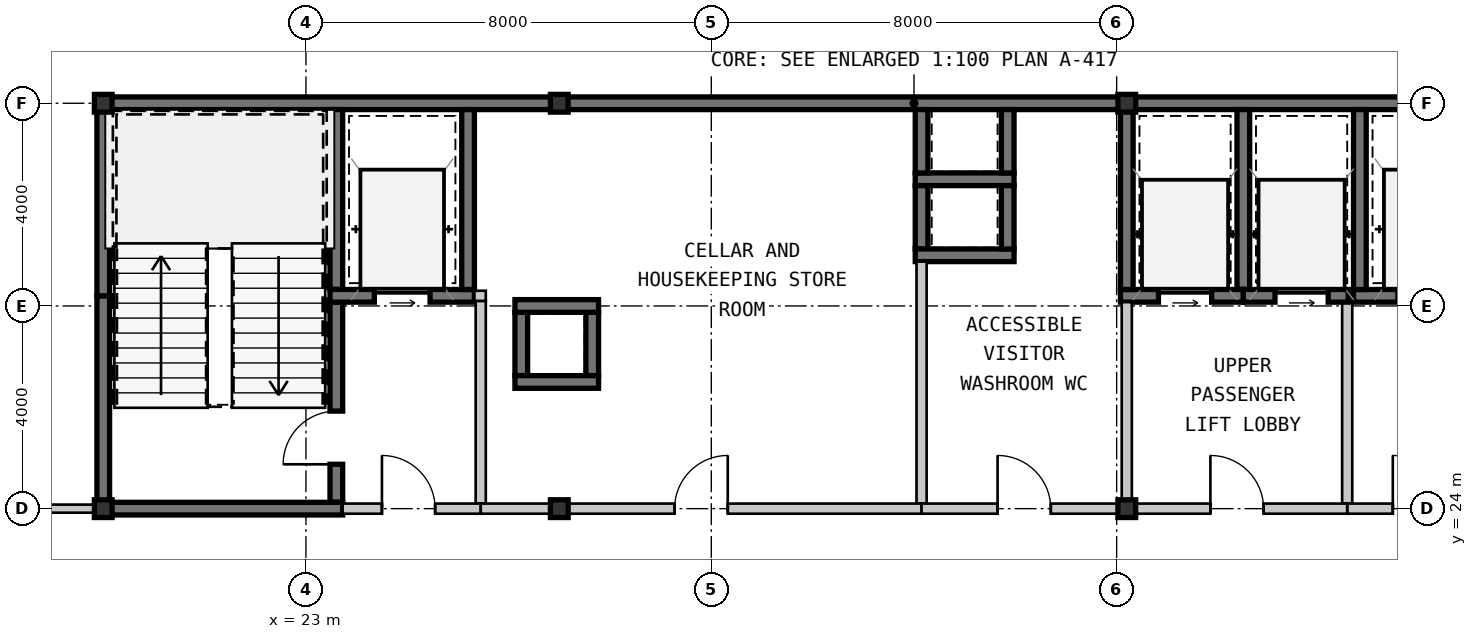
"""IFC4 building model, lengths in metres.
Left out: names, types, materials, properties, quantities, classifications, styles, units other than length and angle.
Written with IfcOpenShell. Run it as: python <this file> out.ifc"""

import sys

from ifc_helpers import new_model, si_unit, direction, frame, frame_2d, origin, origin_2d, place, context, subcontext, project, spatial, rectangle, hollow_rectangle, extrude, source, transform, mapped, element, fill, save


model = new_model("IFC4")
c1 = context("Model", 3, precision=1e-05, world=origin(), true_north=direction((0.0, 1.0)))
c2 = subcontext(c1, "Body", "Model", "MODEL_VIEW")
j1 = project(units=[si_unit("LENGTHUNIT", "METRE"), si_unit("PLANEANGLEUNIT", "RADIAN")], contexts=[c1])
p1 = place(None, origin())
s1 = spatial("IfcSite", under=j1, at=p1, CompositionType="ELEMENT")
p2 = place(p1, origin())
s2 = spatial("IfcBuilding", under=s1, at=p2, CompositionType="ELEMENT")
p3 = place(p2, frame((0.0, 0.0, 185.15)))
s3 = spatial("IfcBuildingStorey", under=s2, at=p3, CompositionType="ELEMENT", Elevation=185.15)
m1 = source(origin(), c2, "Body", "SweptSolid", [
    extrude(hollow_rectangle(XDim=0.35, YDim=0.35, WallThickness=0.016, at=origin_2d()), origin(), (0.0, 0.0, 1.0), 3.15),
])
for number, where, z_axis, x_axis in (
    (1, (19.0, 24.0, 0.0), (0.0, 0.0, 1.0), (1.0, 0.0, 0.0)),
    (2, (28.0, 24.0, 0.0), (0.0, 0.0, 1.0), (1.0, 0.0, 0.0)),
    (3, (39.2, 24.0, 0.0), (0.0, 0.0, 1.0), (1.0, 0.0, 0.0)),
    (4, (19.0, 32.0, 0.0), (0.0, 0.0, 1.0), (1.0, 0.0, 0.0)),
    (5, (28.0, 32.0, 0.0), (0.0, 0.0, 1.0), (1.0, 0.0, 0.0)),
    (6, (39.2, 32.0, 0.0), (0.0, 0.0, 1.0), (1.0, 0.0, 0.0)),
):
    element("IfcColumn", number, at=place(p3, frame(where, z_axis=z_axis, x_axis=x_axis)), inside=s3, PredefinedType="COLUMN", context=c2, shape_type="MappedRepresentation", body=[
        mapped(m1, transform((0.0, 0.0, 0.0), scale=1.0)),
    ])
m2 = source(origin(), c2, "Body", "SweptSolid", [
    extrude(rectangle(XDim=9.125, YDim=0.25, at=frame_2d((4.562, 0.0))), origin(), (0.0, 0.0, 1.0), 2.93),
])
p4 = place(p3, frame((18.875, 32.0, 0.0), z_axis=(0.0, 0.0, 1.0), x_axis=(1.0, 0.0, 0.0)))
e7 = element("IfcWall", 7, at=p4, inside=s3, PredefinedType="SHEAR", context=c2, shape_type="MappedRepresentation", body=[
    mapped(m2, transform((0.0, 0.0, 0.0), scale=1.0)),
])
m3 = source(origin(), c2, "Body", "SweptSolid", [
    extrude(rectangle(XDim=11.2, YDim=0.25, at=frame_2d((5.6, 0.0))), origin(), (0.0, 0.0, 1.0), 2.93),
])
p5 = place(p3, frame((28.0, 32.0, 0.0), z_axis=(0.0, 0.0, 1.0), x_axis=(1.0, 0.0, 0.0)))
e8 = element("IfcWall", 8, at=p5, inside=s3, PredefinedType="SHEAR", context=c2, shape_type="MappedRepresentation", body=[
    mapped(m3, transform((0.0, 0.0, 0.0), scale=1.0)),
])
m4 = source(origin(), c2, "Body", "SweptSolid", [
    extrude(rectangle(XDim=11.925, YDim=0.25, at=frame_2d((5.962, 0.0))), origin(), (0.0, 0.0, 1.0), 2.93),
])
p6 = place(p3, frame((39.2, 32.0, 0.0), z_axis=(0.0, 0.0, 1.0), x_axis=(1.0, 0.0, 0.0)))
e9 = element("IfcWall", 9, at=p6, inside=s3, PredefinedType="SHEAR", context=c2, shape_type="MappedRepresentation", body=[
    mapped(m4, transform((0.0, 0.0, 0.0), scale=1.0)),
])
m5 = source(origin(), c2, "Body", "SweptSolid", [
    extrude(rectangle(XDim=4.075, YDim=0.25, at=frame_2d((2.038, 0.0))), origin(), (0.0, 0.0, 1.0), 2.93),
])
p7 = place(p3, frame((19.0, 24.125, 0.0), z_axis=(0.0, 0.0, 1.0), x_axis=(0.0, 1.0, 0.0)))
e10 = element("IfcWall", 10, at=p7, inside=s3, PredefinedType="SHEAR", context=c2, shape_type="MappedRepresentation", body=[
    mapped(m5, transform((0.0, 0.0, 0.0), scale=1.0)),
])
m6 = source(origin(), c2, "Body", "SweptSolid", [
    extrude(rectangle(XDim=3.675, YDim=0.25, at=frame_2d((1.837, 0.0))), origin(), (0.0, 0.0, 1.0), 2.93),
])
p8 = place(p3, frame((19.0, 28.2, 0.0), z_axis=(0.0, 0.0, 1.0), x_axis=(0.0, 1.0, 0.0)))
e11 = element("IfcWall", 11, at=p8, inside=s3, PredefinedType="SHEAR", context=c2, shape_type="MappedRepresentation", body=[
    mapped(m6, transform((0.0, 0.0, 0.0), scale=1.0)),
])
m7 = source(origin(), c2, "Body", "SweptSolid", [
    extrude(rectangle(XDim=3.55, YDim=0.25, at=frame_2d((1.775, 0.0))), origin(), (0.0, 0.0, 1.0), 2.93),
])
p9 = place(p3, frame((23.6, 28.325, 0.0), z_axis=(0.0, 0.0, 1.0), x_axis=(0.0, 1.0, 0.0)))
e12 = element("IfcWall", 12, at=p9, inside=s3, PredefinedType="SHEAR", context=c2, shape_type="MappedRepresentation", body=[
    mapped(m7, transform((0.0, 0.0, 0.0), scale=1.0)),
])
m8 = source(origin(), c2, "Body", "SweptSolid", [
    extrude(rectangle(XDim=3.95, YDim=0.25, at=frame_2d((1.975, 0.0))), origin(), (0.0, 0.0, 1.0), 2.93),
])
p10 = place(p3, frame((23.6, 24.125, 0.0), z_axis=(0.0, 0.0, 1.0), x_axis=(0.0, 1.0, 0.0)))
e13 = element("IfcWall", 13, at=p10, inside=s3, PredefinedType="SHEAR", context=c2, shape_type="MappedRepresentation", body=[
    mapped(m8, transform((0.0, 0.0, 0.0), scale=1.0)),
])
m9 = source(origin(), c2, "Body", "SweptSolid", [
    extrude(rectangle(XDim=1.05, YDim=2.1, at=frame_2d((0.525, 1.05))), frame((0.0, 0.135, 0.0), z_axis=(0.0, -1.0, 0.0), x_axis=(1.0, 0.0, 0.0)), (0.0, 0.0, 1.0), 0.27),
])
p11 = place(p10, frame((0.75, 0.0, 0.0)))
e14 = element("IfcOpeningElement", 14, at=p11, cuts=e13, PredefinedType="OPENING", context=c2, shape_type="MappedRepresentation", body=[
    mapped(m9, transform((0.0, 0.0, 0.0), scale=1.0)),
])
m10 = source(origin(), c2, "Body", "SweptSolid", [
    extrude(rectangle(XDim=4.85, YDim=0.25, at=frame_2d((2.425, 0.0))), origin(), (0.0, 0.0, 1.0), 2.93),
])
p12 = place(p3, frame((18.875, 24.0, 0.0), z_axis=(0.0, 0.0, 1.0), x_axis=(1.0, 0.0, 0.0)))
e15 = element("IfcWall", 15, at=p12, inside=s3, PredefinedType="SHEAR", context=c2, shape_type="MappedRepresentation", body=[
    mapped(m10, transform((0.0, 0.0, 0.0), scale=1.0)),
])
m11 = source(origin(), c2, "Body", "SweptSolid", [
    extrude(rectangle(XDim=2.85, YDim=0.25, at=frame_2d((1.425, 0.0))), origin(), (0.0, 0.0, 1.0), 2.93),
])
p13 = place(p3, frame((23.475, 28.2, 0.0), z_axis=(0.0, 0.0, 1.0), x_axis=(1.0, 0.0, 0.0)))
e16 = element("IfcWall", 16, at=p13, inside=s3, PredefinedType="SHEAR", context=c2, shape_type="MappedRepresentation", body=[
    mapped(m11, transform((0.0, 0.0, 0.0), scale=1.0)),
])
m12 = source(origin(), c2, "Body", "SweptSolid", [
    extrude(rectangle(XDim=1.1, YDim=2.15, at=frame_2d((0.55, 1.075))), frame((0.0, 0.135, 0.0), z_axis=(0.0, -1.0, 0.0), x_axis=(1.0, 0.0, 0.0)), (0.0, 0.0, 1.0), 0.27),
])
p14 = place(p13, frame((0.875, 0.0, 0.0)))
e17 = element("IfcOpeningElement", 17, at=p14, cuts=e16, PredefinedType="OPENING", context=c2, shape_type="MappedRepresentation", body=[
    mapped(m12, transform((0.0, 0.0, 0.0), scale=1.0)),
])
p15 = place(p3, frame((26.2, 28.325, 0.0), z_axis=(0.0, 0.0, 1.0), x_axis=(0.0, 1.0, 0.0)))
e18 = element("IfcWall", 18, at=p15, inside=s3, PredefinedType="SHEAR", context=c2, shape_type="MappedRepresentation", body=[
    mapped(m7, transform((0.0, 0.0, 0.0), scale=1.0)),
])
m13 = source(origin(), c2, "Body", "SweptSolid", [
    extrude(rectangle(XDim=4.0, YDim=0.2, at=frame_2d((2.0, 0.0))), origin(), (0.0, 0.0, 1.0), 2.93),
])
p16 = place(p3, frame((26.45, 24.1, 0.0), z_axis=(0.0, 0.0, 1.0), x_axis=(0.0, 1.0, 0.0)))
e19 = element("IfcWall", 19, at=p16, inside=s3, PredefinedType="SOLIDWALL", context=c2, shape_type="MappedRepresentation", body=[
    mapped(m13, transform((0.0, 0.0, 0.0), scale=1.0)),
])
m14 = source(origin(), c2, "Body", "SweptSolid", [
    extrude(rectangle(XDim=2.725, YDim=0.2, at=frame_2d((1.362, 0.0))), origin(), (0.0, 0.0, 1.0), 2.47),
])
p17 = place(p3, frame((23.725, 24.0, 0.0), z_axis=(0.0, 0.0, 1.0), x_axis=(1.0, 0.0, 0.0)))
e20 = element("IfcWall", 20, at=p17, inside=s3, PredefinedType="SOLIDWALL", context=c2, shape_type="MappedRepresentation", body=[
    mapped(m14, transform((0.0, 0.0, 0.0), scale=1.0)),
])
m15 = source(origin(), c2, "Body", "SweptSolid", [
    extrude(rectangle(XDim=1.05, YDim=2.1, at=frame_2d((0.525, 1.05))), frame((0.0, 0.11, 0.0), z_axis=(0.0, -1.0, 0.0), x_axis=(1.0, 0.0, 0.0)), (0.0, 0.0, 1.0), 0.22),
])
p18 = place(p17, frame((0.775, 0.0, 0.0)))
e21 = element("IfcOpeningElement", 21, at=p18, cuts=e20, PredefinedType="OPENING", context=c2, shape_type="MappedRepresentation", body=[
    mapped(m15, transform((0.0, 0.0, 0.0), scale=1.0)),
])
p19 = place(p3, frame((43.675, 28.2, 0.0), z_axis=(0.0, 0.0, 1.0), x_axis=(1.0, 0.0, 0.0)))
e22 = element("IfcWall", 22, at=p19, inside=s3, PredefinedType="SHEAR", context=c2, shape_type="MappedRepresentation", body=[
    mapped(m11, transform((0.0, 0.0, 0.0), scale=1.0)),
])
p20 = place(p19, frame((0.875, 0.0, 0.0)))
e23 = element("IfcOpeningElement", 23, at=p20, cuts=e22, PredefinedType="OPENING", context=c2, shape_type="MappedRepresentation", body=[
    mapped(m12, transform((0.0, 0.0, 0.0), scale=1.0)),
])
p21 = place(p3, frame((43.8, 31.875, 0.0), z_axis=(0.0, 0.0, 1.0), x_axis=(0.0, -1.0, 0.0)))
e24 = element("IfcWall", 24, at=p21, inside=s3, PredefinedType="SHEAR", context=c2, shape_type="MappedRepresentation", body=[
    mapped(m7, transform((0.0, 0.0, 0.0), scale=1.0)),
])
m16 = source(origin(), c2, "Body", "SweptSolid", [
    extrude(rectangle(XDim=3.975, YDim=0.2, at=frame_2d((1.987, 0.0))), origin(), (0.0, 0.0, 1.0), 2.93),
])
p22 = place(p3, frame((43.55, 28.075, 0.0), z_axis=(0.0, 0.0, 1.0), x_axis=(0.0, -1.0, 0.0)))
e25 = element("IfcWall", 25, at=p22, inside=s3, PredefinedType="SOLIDWALL", context=c2, shape_type="MappedRepresentation", body=[
    mapped(m16, transform((0.0, 0.0, 0.0), scale=1.0)),
])
m17 = source(origin(), c2, "Body", "SweptSolid", [
    extrude(rectangle(XDim=2.725, YDim=0.2, at=frame_2d((1.362, 0.0))), origin(), (0.0, 0.0, 1.0), 2.397),
])
p23 = place(p3, frame((43.55, 24.0, 0.0), z_axis=(0.0, 0.0, 1.0), x_axis=(1.0, 0.0, 0.0)))
e26 = element("IfcWall", 26, at=p23, inside=s3, PredefinedType="SOLIDWALL", context=c2, shape_type="MappedRepresentation", body=[
    mapped(m17, transform((0.0, 0.0, 0.0), scale=1.0)),
])
p24 = place(p23, frame((0.9, 0.0, 0.0)))
e27 = element("IfcOpeningElement", 27, at=p24, cuts=e26, PredefinedType="OPENING", context=c2, shape_type="MappedRepresentation", body=[
    mapped(m15, transform((0.0, 0.0, 0.0), scale=1.0)),
])
m18 = source(origin(), c2, "Body", "SweptSolid", [
    extrude(rectangle(XDim=1.95, YDim=0.25, at=frame_2d((0.975, 0.0))), origin(), (0.0, 0.0, 1.0), 2.93),
])
p25 = place(p3, frame((35.025, 30.5, 0.0), z_axis=(0.0, 0.0, 1.0), x_axis=(1.0, 0.0, 0.0)))
e28 = element("IfcWall", 28, at=p25, inside=s3, PredefinedType="SHEAR", context=c2, shape_type="MappedRepresentation", body=[
    mapped(m18, transform((0.0, 0.0, 0.0), scale=1.0)),
])
m19 = source(origin(), c2, "Body", "SweptSolid", [
    extrude(rectangle(XDim=1.25, YDim=0.25, at=frame_2d((0.625, 0.0))), origin(), (0.0, 0.0, 1.0), 2.93),
])
for number, where, z_axis, x_axis in (
    (29, (35.15, 31.875, 0.0), (0.0, 0.0, 1.0), (0.0, -1.0, 0.0)),
    (30, (36.85, 30.625, 0.0), (0.0, 0.0, 1.0), (0.0, 1.0, 0.0)),
    (31, (35.15, 30.375, 0.0), (0.0, 0.0, 1.0), (0.0, -1.0, 0.0)),
):
    element("IfcWall", number, at=place(p3, frame(where, z_axis=z_axis, x_axis=x_axis)), inside=s3, PredefinedType="SHEAR", context=c2, shape_type="MappedRepresentation", body=[
        mapped(m19, transform((0.0, 0.0, 0.0), scale=1.0)),
    ])
p26 = place(p3, frame((35.025, 29.0, 0.0), z_axis=(0.0, 0.0, 1.0), x_axis=(1.0, 0.0, 0.0)))
e32 = element("IfcWall", 32, at=p26, inside=s3, PredefinedType="SHEAR", context=c2, shape_type="MappedRepresentation", body=[
    mapped(m18, transform((0.0, 0.0, 0.0), scale=1.0)),
])
for number, where, z_axis, x_axis in (
    (33, (36.85, 29.125, 0.0), (0.0, 0.0, 1.0), (0.0, 1.0, 0.0)),
    (34, (28.65, 26.625, 0.0), (0.0, 0.0, 1.0), (0.0, 1.0, 0.0)),
    (35, (27.25, 27.875, 0.0), (0.0, 0.0, 1.0), (0.0, -1.0, 0.0)),
):
    element("IfcWall", number, at=place(p3, frame(where, z_axis=z_axis, x_axis=x_axis)), inside=s3, PredefinedType="SHEAR", context=c2, shape_type="MappedRepresentation", body=[
        mapped(m19, transform((0.0, 0.0, 0.0), scale=1.0)),
    ])
m20 = source(origin(), c2, "Body", "SweptSolid", [
    extrude(rectangle(XDim=1.65, YDim=0.25, at=frame_2d((0.825, 0.0))), origin(), (0.0, 0.0, 1.0), 2.93),
])
for number, where, z_axis, x_axis in (
    (36, (28.775, 28.0, 0.0), (0.0, 0.0, 1.0), (-1.0, 0.0, 0.0)),
    (37, (27.125, 26.5, 0.0), (0.0, 0.0, 1.0), (1.0, 0.0, 0.0)),
):
    element("IfcWall", number, at=place(p3, frame(where, z_axis=z_axis, x_axis=x_axis)), inside=s3, PredefinedType="SHEAR", context=c2, shape_type="MappedRepresentation", body=[
        mapped(m20, transform((0.0, 0.0, 0.0), scale=1.0)),
    ])
p27 = place(p3, frame((41.5, 28.325, 0.0), z_axis=(0.0, 0.0, 1.0), x_axis=(0.0, 1.0, 0.0)))
e38 = element("IfcWall", 38, at=p27, inside=s3, PredefinedType="SHEAR", context=c2, shape_type="MappedRepresentation", body=[
    mapped(m7, transform((0.0, 0.0, 0.0), scale=1.0)),
])
m21 = source(origin(), c2, "Body", "SweptSolid", [
    extrude(rectangle(XDim=2.425, YDim=0.25, at=frame_2d((1.212, 0.0))), origin(), (0.0, 0.0, 1.0), 2.93),
])
p28 = place(p3, frame((39.075, 28.2, 0.0), z_axis=(0.0, 0.0, 1.0), x_axis=(1.0, 0.0, 0.0)))
e39 = element("IfcWall", 39, at=p28, inside=s3, PredefinedType="SHEAR", context=c2, shape_type="MappedRepresentation", body=[
    mapped(m21, transform((0.0, 0.0, 0.0), scale=1.0)),
])
m22 = source(origin(), c2, "Body", "SweptSolid", [
    extrude(rectangle(XDim=1.05, YDim=2.15, at=frame_2d((0.525, 1.075))), frame((0.0, 0.135, 0.0), z_axis=(0.0, -1.0, 0.0), x_axis=(1.0, 0.0, 0.0)), (0.0, 0.0, 1.0), 0.27),
])
p29 = place(p28, frame((0.75, 0.0, 0.0)))
e40 = element("IfcOpeningElement", 40, at=p29, cuts=e39, PredefinedType="OPENING", context=c2, shape_type="MappedRepresentation", body=[
    mapped(m22, transform((0.0, 0.0, 0.0), scale=1.0)),
])
p30 = place(p3, frame((39.2, 31.875, 0.0), z_axis=(0.0, 0.0, 1.0), x_axis=(0.0, -1.0, 0.0)))
e41 = element("IfcWall", 41, at=p30, inside=s3, PredefinedType="SHEAR", context=c2, shape_type="MappedRepresentation", body=[
    mapped(m7, transform((0.0, 0.0, 0.0), scale=1.0)),
])
m23 = source(origin(), c2, "Body", "SweptSolid", [
    extrude(rectangle(XDim=2.07, YDim=0.25, at=frame_2d((1.035, 0.0))), origin(), (0.0, 0.0, 1.0), 2.93),
])
p31 = place(p3, frame((41.5, 28.2, 0.0), z_axis=(0.0, 0.0, 1.0), x_axis=(1.0, 0.0, 0.0)))
e42 = element("IfcWall", 42, at=p31, inside=s3, PredefinedType="SHEAR", context=c2, shape_type="MappedRepresentation", body=[
    mapped(m23, transform((0.0, 0.0, 0.0), scale=1.0)),
])
p32 = place(p31, frame((0.625, 0.0, 0.0)))
e43 = element("IfcOpeningElement", 43, at=p32, cuts=e42, PredefinedType="OPENING", context=c2, shape_type="MappedRepresentation", body=[
    mapped(m22, transform((0.0, 0.0, 0.0), scale=1.0)),
])
m24 = source(origin(), c2, "Body", "SweptSolid", [
    extrude(rectangle(XDim=3.975, YDim=0.2, at=frame_2d((1.987, 0.0))), origin(), (0.0, 0.0, 1.0), 2.47),
])
p33 = place(p3, frame((39.2, 24.1, 0.0), z_axis=(0.0, 0.0, 1.0), x_axis=(0.0, 1.0, 0.0)))
e44 = element("IfcWall", 44, at=p33, inside=s3, PredefinedType="SOLIDWALL", context=c2, shape_type="MappedRepresentation", body=[
    mapped(m24, transform((0.0, 0.0, 0.0), scale=1.0)),
])
m25 = source(origin(), c2, "Body", "SweptSolid", [
    extrude(rectangle(XDim=4.35, YDim=0.2, at=frame_2d((2.175, 0.0))), origin(), (0.0, 0.0, 1.0), 2.397),
])
p34 = place(p3, frame((43.55, 24.0, 0.0), z_axis=(0.0, 0.0, 1.0), x_axis=(-1.0, 0.0, 0.0)))
e45 = element("IfcWall", 45, at=p34, inside=s3, PredefinedType="SOLIDWALL", context=c2, shape_type="MappedRepresentation", body=[
    mapped(m25, transform((0.0, 0.0, 0.0), scale=1.0)),
])
p35 = place(p34, frame((1.65, 0.0, 0.0)))
e46 = element("IfcOpeningElement", 46, at=p35, cuts=e45, PredefinedType="OPENING", context=c2, shape_type="MappedRepresentation", body=[
    mapped(m15, transform((0.0, 0.0, 0.0), scale=1.0)),
])
m26 = source(origin(), c2, "Body", "SweptSolid", [
    extrude(rectangle(XDim=4.775, YDim=0.2, at=frame_2d((2.387, 0.0))), origin(), (0.0, 0.0, 1.0), 2.93),
])
p36 = place(p3, frame((35.15, 28.875, 0.0), z_axis=(0.0, 0.0, 1.0), x_axis=(0.0, -1.0, 0.0)))
e47 = element("IfcWall", 47, at=p36, inside=s3, PredefinedType="SOLIDWALL", context=c2, shape_type="MappedRepresentation", body=[
    mapped(m26, transform((0.0, 0.0, 0.0), scale=1.0)),
])
m27 = source(origin(), c2, "Body", "SweptSolid", [
    extrude(rectangle(XDim=8.7, YDim=0.2, at=frame_2d((4.35, 0.0))), origin(), (0.0, 0.0, 1.0), 2.47),
])
p37 = place(p3, frame((35.15, 24.0, 0.0), z_axis=(0.0, 0.0, 1.0), x_axis=(-1.0, 0.0, 0.0)))
e48 = element("IfcWall", 48, at=p37, inside=s3, PredefinedType="SOLIDWALL", context=c2, shape_type="MappedRepresentation", body=[
    mapped(m27, transform((0.0, 0.0, 0.0), scale=1.0)),
])
p38 = place(p37, frame((3.825, 0.0, 0.0)))
e49 = element("IfcOpeningElement", 49, at=p38, cuts=e48, PredefinedType="OPENING", context=c2, shape_type="MappedRepresentation", body=[
    mapped(m15, transform((0.0, 0.0, 0.0), scale=1.0)),
])
m28 = source(origin(), c2, "Body", "SweptSolid", [
    extrude(rectangle(XDim=4.05, YDim=0.2, at=frame_2d((2.025, 0.0))), origin(), (0.0, 0.0, 1.0), 2.47),
])
p39 = place(p3, frame((39.2, 24.0, 0.0), z_axis=(0.0, 0.0, 1.0), x_axis=(-1.0, 0.0, 0.0)))
e50 = element("IfcWall", 50, at=p39, inside=s3, PredefinedType="SOLIDWALL", context=c2, shape_type="MappedRepresentation", body=[
    mapped(m28, transform((0.0, 0.0, 0.0), scale=1.0)),
])
p40 = place(p39, frame((1.5, 0.0, 0.0)))
e51 = element("IfcOpeningElement", 51, at=p40, cuts=e50, PredefinedType="OPENING", context=c2, shape_type="MappedRepresentation", body=[
    mapped(m15, transform((0.0, 0.0, 0.0), scale=1.0)),
])
m29 = source(origin(), c2, "Body", "SweptSolid", [
    extrude(rectangle(XDim=6.251, YDim=0.16, at=frame_2d((3.125, 0.0))), origin(), (0.0, 0.0, 1.0), 2.93),
])
p41 = place(p3, frame((12.624, 24.0, 0.0), z_axis=(0.0, 0.0, 1.0), x_axis=(1.0, 0.0, 0.0)))
e52 = element("IfcWall", 52, at=p41, inside=s3, PredefinedType="PARTITIONING", context=c2, shape_type="MappedRepresentation", body=[
    mapped(m29, transform((0.0, 0.0, 0.0), scale=1.0)),
])
m30 = source(origin(), c2, "Body", "SweptSolid", [
    extrude(rectangle(XDim=0.92, YDim=2.1, at=frame_2d((0.46, 1.05))), frame((0.0, 0.09, 0.0), z_axis=(0.0, -1.0, 0.0), x_axis=(1.0, 0.0, 0.0)), (0.0, 0.0, 1.0), 0.18),
])
p42 = place(p41, frame((2.718, 0.0, 0.0)))
e53 = element("IfcOpeningElement", 53, at=p42, cuts=e52, PredefinedType="OPENING", context=c2, shape_type="MappedRepresentation", body=[
    mapped(m30, transform((0.0, 0.0, 0.0), scale=1.0)),
])
m31 = source(origin(), c2, "Body", "SweptSolid", [
    extrude(rectangle(XDim=0.225, YDim=0.2, at=frame_2d((0.113, 0.0))), origin(), (0.0, 0.0, 1.0), 2.93),
])
p43 = place(p3, frame((26.325, 28.2, 0.0), z_axis=(0.0, 0.0, 1.0), x_axis=(1.0, 0.0, 0.0)))
e54 = element("IfcWall", 54, at=p43, inside=s3, PredefinedType="SOLIDWALL", context=c2, shape_type="MappedRepresentation", body=[
    mapped(m31, transform((0.0, 0.0, 0.0), scale=1.0)),
])
m32 = source(origin(), c2, "Body", "SweptSolid", [
    extrude(rectangle(XDim=1.05, YDim=2.1, at=frame_2d((0.525, 1.05))), frame((0.0, 0.025, 0.0), z_axis=(0.0, -1.0, 0.0), x_axis=(1.0, 0.0, 0.0)), (0.0, 0.0, 1.0), 0.05),
])
p44 = place(p11, origin())
e55 = element("IfcDoor", 55, at=p44, inside=s3, OperationType="SINGLE_SWING_LEFT", PredefinedType="DOOR", context=c2, shape_type="MappedRepresentation", body=[
    mapped(m32, transform((0.0, 0.0, 0.0), scale=1.0)),
])
fill(e14, e55)
m33 = source(origin(), c2, "Body", "SweptSolid", [
    extrude(rectangle(XDim=1.1, YDim=2.15, at=frame_2d((0.55, 1.075))), frame((0.0, 0.025, 0.0), z_axis=(0.0, -1.0, 0.0), x_axis=(1.0, 0.0, 0.0)), (0.0, 0.0, 1.0), 0.05),
])
p45 = place(p14, origin())
e56 = element("IfcDoor", 56, at=p45, inside=s3, OperationType="SLIDING_TO_LEFT", PredefinedType="DOOR", context=c2, shape_type="MappedRepresentation", body=[
    mapped(m33, transform((0.0, 0.0, 0.0), scale=1.0)),
])
fill(e17, e56)
p46 = place(p18, origin())
e57 = element("IfcDoor", 57, at=p46, inside=s3, OperationType="SINGLE_SWING_LEFT", PredefinedType="DOOR", context=c2, shape_type="MappedRepresentation", body=[
    mapped(m32, transform((0.0, 0.0, 0.0), scale=1.0)),
])
fill(e21, e57)
p47 = place(p24, origin())
e58 = element("IfcDoor", 58, at=p47, inside=s3, OperationType="SINGLE_SWING_LEFT", PredefinedType="DOOR", context=c2, shape_type="MappedRepresentation", body=[
    mapped(m32, transform((0.0, 0.0, 0.0), scale=1.0)),
])
fill(e27, e58)
m34 = source(origin(), c2, "Body", "SweptSolid", [
    extrude(rectangle(XDim=1.05, YDim=2.15, at=frame_2d((0.525, 1.075))), frame((0.0, 0.025, 0.0), z_axis=(0.0, -1.0, 0.0), x_axis=(1.0, 0.0, 0.0)), (0.0, 0.0, 1.0), 0.05),
])
p48 = place(p29, origin())
e59 = element("IfcDoor", 59, at=p48, inside=s3, OperationType="SLIDING_TO_LEFT", PredefinedType="DOOR", context=c2, shape_type="MappedRepresentation", body=[
    mapped(m34, transform((0.0, 0.0, 0.0), scale=1.0)),
])
fill(e40, e59)
p49 = place(p32, origin())
e60 = element("IfcDoor", 60, at=p49, inside=s3, OperationType="SLIDING_TO_LEFT", PredefinedType="DOOR", context=c2, shape_type="MappedRepresentation", body=[
    mapped(m34, transform((0.0, 0.0, 0.0), scale=1.0)),
])
fill(e43, e60)
p50 = place(p35, frame((1.05, 0.0, 0.0), z_axis=(0.0, 0.0, 1.0), x_axis=(-1.0, 0.0, 0.0)))
e61 = element("IfcDoor", 61, at=p50, inside=s3, OperationType="SINGLE_SWING_LEFT", PredefinedType="DOOR", context=c2, shape_type="MappedRepresentation", body=[
    mapped(m32, transform((0.0, 0.0, 0.0), scale=1.0)),
])
fill(e46, e61)
p51 = place(p38, frame((1.05, 0.0, 0.0), z_axis=(0.0, 0.0, 1.0), x_axis=(-1.0, 0.0, 0.0)))
e62 = element("IfcDoor", 62, at=p51, inside=s3, OperationType="SINGLE_SWING_RIGHT", PredefinedType="DOOR", context=c2, shape_type="MappedRepresentation", body=[
    mapped(m32, transform((0.0, 0.0, 0.0), scale=1.0)),
])
fill(e49, e62)
p52 = place(p40, frame((1.05, 0.0, 0.0), z_axis=(0.0, 0.0, 1.0), x_axis=(-1.0, 0.0, 0.0)))
e63 = element("IfcDoor", 63, at=p52, inside=s3, OperationType="SINGLE_SWING_LEFT", PredefinedType="DOOR", context=c2, shape_type="MappedRepresentation", body=[
    mapped(m32, transform((0.0, 0.0, 0.0), scale=1.0)),
])
fill(e51, e63)
save(model, sys.argv[1])
